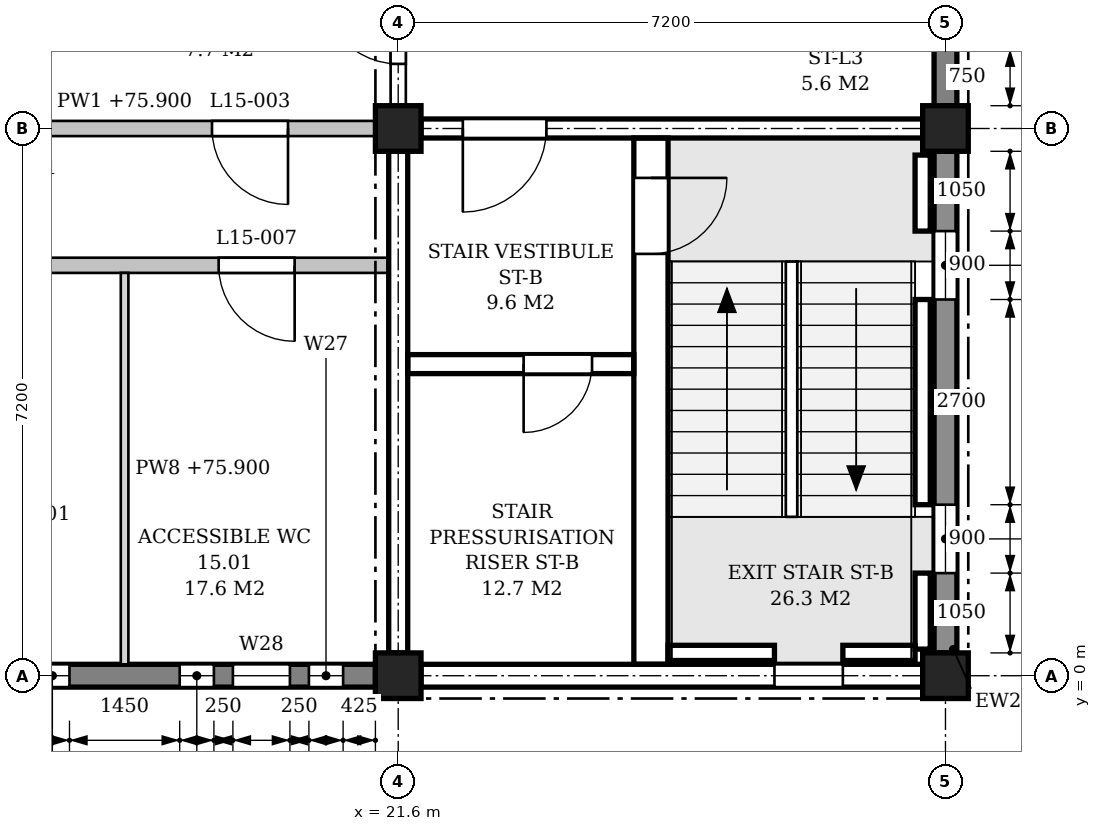
"""IFC4 building model, lengths in metres.
Left out: names, types, materials, properties, quantities, classifications, styles, units other than length and angle.
Written with IfcOpenShell. Run it as: python <this file> out.ifc"""

import sys

from ifc_helpers import new_model, si_unit, direction, frame, frame_2d, origin, origin_2d, place, context, subcontext, project, spatial, polyline, rectangle, outline, extrude, element, fill, save


model = new_model("IFC4")
c1 = context("Model", 3, precision=1e-05, world=origin(), true_north=direction((0.0, 1.0)))
c2 = subcontext(c1, "Body", "Model", "MODEL_VIEW")
j1 = project(units=[si_unit("LENGTHUNIT", "METRE"), si_unit("PLANEANGLEUNIT", "RADIAN")], contexts=[c1])
p1 = place(None, origin())
s1 = spatial("IfcSite", under=j1, at=p1, CompositionType="ELEMENT")
p2 = place(p1, origin())
s2 = spatial("IfcBuilding", under=s1, at=p2, CompositionType="ELEMENT")
p3 = place(p2, frame((0.0, 0.0, 72.3)))
s3 = spatial("IfcBuildingStorey", under=s2, at=p3, CompositionType="ELEMENT", Elevation=72.3)
for number, where, z_axis, x_axis in (
    (1, (21.6, 0.0, 0.0), (0.0, 0.0, 1.0), (1.0, 0.0, 0.0)),
    (2, (21.6, 7.2, 0.0), (0.0, 0.0, 1.0), (1.0, 0.0, 0.0)),
    (3, (28.8, 0.0, 0.0), (0.0, 0.0, 1.0), (1.0, 0.0, 0.0)),
    (4, (28.8, 7.2, 0.0), (0.0, 0.0, 1.0), (1.0, 0.0, 0.0)),
):
    element("IfcColumn", number, at=place(p3, frame(where, z_axis=z_axis, x_axis=x_axis)), inside=s3, PredefinedType="COLUMN", context=c2, shape_type="SweptSolid", body=[
        extrude(rectangle(XDim=0.6, YDim=0.6, at=origin_2d()), origin(), (0.0, 0.0, 1.0), 4.5),
    ])
p4 = place(p3, frame((14.7, 0.0, 0.0), z_axis=(0.0, 0.0, 1.0), x_axis=(1.0, 0.0, 0.0)))
e5 = element("IfcWall", 5, at=p4, inside=s3, PredefinedType="STANDARD", context=c2, shape_type="SweptSolid", body=[
    extrude(rectangle(XDim=6.6, YDim=0.3, at=frame_2d((3.3, 0.0))), origin(), (0.0, 0.0, 1.0), 3.65),
])
p5 = place(p4, frame((0.425, 0.0, 1.5)))
e6 = element("IfcOpeningElement", 6, at=p5, cuts=e5, PredefinedType="OPENING", context=c2, shape_type="SweptSolid", body=[
    extrude(outline(polyline([(0.0, 0.0), (0.45, 0.0), (0.45, 1.85), (0.225, 2.1), (0.0, 1.85), (0.0, 0.0)])), frame((0.0, 0.16, 0.0), z_axis=(0.0, -1.0, 0.0), x_axis=(1.0, 0.0, 0.0)), (0.0, 0.0, 1.0), 0.32),
])
p6 = place(p4, frame((1.125, 0.0, 0.9)))
e7 = element("IfcOpeningElement", 7, at=p6, cuts=e5, PredefinedType="OPENING", context=c2, shape_type="SweptSolid", body=[
    extrude(outline(polyline([(0.0, 0.0), (0.75, 0.0), (0.75, 2.25), (0.375, 2.7), (0.0, 2.25), (0.0, 0.0)])), frame((0.0, 0.16, 0.0), z_axis=(0.0, -1.0, 0.0), x_axis=(1.0, 0.0, 0.0)), (0.0, 0.0, 1.0), 0.32),
])
p7 = place(p4, frame((2.125, 0.0, 1.5)))
e8 = element("IfcOpeningElement", 8, at=p7, cuts=e5, PredefinedType="OPENING", context=c2, shape_type="SweptSolid", body=[
    extrude(outline(polyline([(0.0, 0.0), (0.45, 0.0), (0.45, 1.85), (0.225, 2.1), (0.0, 1.85), (0.0, 0.0)])), frame((0.0, 0.16, 0.0), z_axis=(0.0, -1.0, 0.0), x_axis=(1.0, 0.0, 0.0)), (0.0, 0.0, 1.0), 0.32),
])
p8 = place(p4, frame((4.025, 0.0, 1.5)))
e9 = element("IfcOpeningElement", 9, at=p8, cuts=e5, PredefinedType="OPENING", context=c2, shape_type="SweptSolid", body=[
    extrude(outline(polyline([(0.0, 0.0), (0.45, 0.0), (0.45, 1.85), (0.225, 2.1), (0.0, 1.85), (0.0, 0.0)])), frame((0.0, 0.16, 0.0), z_axis=(0.0, -1.0, 0.0), x_axis=(1.0, 0.0, 0.0)), (0.0, 0.0, 1.0), 0.32),
])
p9 = place(p4, frame((4.725, 0.0, 0.9)))
e10 = element("IfcOpeningElement", 10, at=p9, cuts=e5, PredefinedType="OPENING", context=c2, shape_type="SweptSolid", body=[
    extrude(outline(polyline([(0.0, 0.0), (0.75, 0.0), (0.75, 2.25), (0.375, 2.7), (0.0, 2.25), (0.0, 0.0)])), frame((0.0, 0.16, 0.0), z_axis=(0.0, -1.0, 0.0), x_axis=(1.0, 0.0, 0.0)), (0.0, 0.0, 1.0), 0.32),
])
p10 = place(p4, frame((5.725, 0.0, 1.5)))
e11 = element("IfcOpeningElement", 11, at=p10, cuts=e5, PredefinedType="OPENING", context=c2, shape_type="SweptSolid", body=[
    extrude(outline(polyline([(0.0, 0.0), (0.45, 0.0), (0.45, 1.85), (0.225, 2.1), (0.0, 1.85), (0.0, 0.0)])), frame((0.0, 0.16, 0.0), z_axis=(0.0, -1.0, 0.0), x_axis=(1.0, 0.0, 0.0)), (0.0, 0.0, 1.0), 0.32),
])
p11 = place(p3, frame((21.9, 0.0, 0.0), z_axis=(0.0, 0.0, 1.0), x_axis=(1.0, 0.0, 0.0)))
e12 = element("IfcWall", 12, at=p11, inside=s3, PredefinedType="STANDARD", context=c2, shape_type="SweptSolid", body=[
    extrude(rectangle(XDim=6.6, YDim=0.3, at=frame_2d((3.3, 0.0))), origin(), (0.0, 0.0, 1.0), 3.65),
])
p12 = place(p11, frame((4.65, 0.0, 0.9)))
e13 = element("IfcOpeningElement", 13, at=p12, cuts=e12, PredefinedType="OPENING", context=c2, shape_type="SweptSolid", body=[
    extrude(outline(polyline([(0.0, 0.0), (0.9, 0.0), (0.9, 2.25), (0.45, 2.7), (0.0, 2.25), (0.0, 0.0)])), frame((0.0, 0.16, 0.0), z_axis=(0.0, -1.0, 0.0), x_axis=(1.0, 0.0, 0.0)), (0.0, 0.0, 1.0), 0.32),
])
p13 = place(p3, frame((28.8, 0.3, 0.0), z_axis=(0.0, 0.0, 1.0), x_axis=(0.0, 1.0, 0.0)))
e14 = element("IfcWall", 14, at=p13, inside=s3, PredefinedType="STANDARD", context=c2, shape_type="SweptSolid", body=[
    extrude(rectangle(XDim=6.6, YDim=0.3, at=frame_2d((3.3, 0.0))), origin(), (0.0, 0.0, 1.0), 3.65),
])
p14 = place(p13, frame((1.05, 0.0, 0.9)))
e15 = element("IfcOpeningElement", 15, at=p14, cuts=e14, PredefinedType="OPENING", context=c2, shape_type="SweptSolid", body=[
    extrude(outline(polyline([(0.0, 0.0), (0.9, 0.0), (0.9, 2.25), (0.45, 2.7), (0.0, 2.25), (0.0, 0.0)])), frame((0.0, 0.16, 0.0), z_axis=(0.0, -1.0, 0.0), x_axis=(1.0, 0.0, 0.0)), (0.0, 0.0, 1.0), 0.32),
])
p15 = place(p13, frame((4.65, 0.0, 0.9)))
e16 = element("IfcOpeningElement", 16, at=p15, cuts=e14, PredefinedType="OPENING", context=c2, shape_type="SweptSolid", body=[
    extrude(outline(polyline([(0.0, 0.0), (0.9, 0.0), (0.9, 2.25), (0.45, 2.7), (0.0, 2.25), (0.0, 0.0)])), frame((0.0, 0.16, 0.0), z_axis=(0.0, -1.0, 0.0), x_axis=(1.0, 0.0, 0.0)), (0.0, 0.0, 1.0), 0.32),
])
p16 = place(p3, frame((28.8, 7.5, 0.0), z_axis=(0.0, 0.0, 1.0), x_axis=(0.0, 1.0, 0.0)))
e17 = element("IfcWall", 17, at=p16, inside=s3, PredefinedType="STANDARD", context=c2, shape_type="SweptSolid", body=[
    extrude(rectangle(XDim=6.6, YDim=0.3, at=frame_2d((3.3, 0.0))), origin(), (0.0, 0.0, 1.0), 3.65),
])
p17 = place(p16, frame((0.75, 0.0, 0.9)))
e18 = element("IfcOpeningElement", 18, at=p17, cuts=e17, PredefinedType="OPENING", context=c2, shape_type="SweptSolid", body=[
    extrude(outline(polyline([(0.0, 0.0), (1.5, 0.0), (1.5, 1.95), (0.75, 2.7), (0.0, 1.95), (0.0, 0.0)])), frame((0.0, 0.16, 0.0), z_axis=(0.0, -1.0, 0.0), x_axis=(1.0, 0.0, 0.0)), (0.0, 0.0, 1.0), 0.32),
])
p18 = place(p3, frame((21.9, 7.2, 0.0), z_axis=(0.0, 0.0, 1.0), x_axis=(1.0, 0.0, 0.0)))
e19 = element("IfcWall", 19, at=p18, inside=s3, PredefinedType="SHEAR", context=c2, shape_type="SweptSolid", body=[
    extrude(rectangle(XDim=6.6, YDim=0.25, at=frame_2d((3.3, 0.0))), origin(), (0.0, 0.0, 1.0), 3.6),
])
p19 = place(p18, frame((0.55, 0.0, 0.0)))
e20 = element("IfcOpeningElement", 20, at=p19, cuts=e19, PredefinedType="OPENING", context=c2, shape_type="SweptSolid", body=[
    extrude(rectangle(XDim=1.1, YDim=2.1, at=frame_2d((0.55, 1.05))), frame((0.0, 0.135, 0.0), z_axis=(0.0, -1.0, 0.0), x_axis=(1.0, 0.0, 0.0)), (0.0, 0.0, 1.0), 0.27),
])
p20 = place(p3, frame((21.6, 0.3, 0.0), z_axis=(0.0, 0.0, 1.0), x_axis=(0.0, 1.0, 0.0)))
e21 = element("IfcWall", 21, at=p20, inside=s3, PredefinedType="SHEAR", context=c2, shape_type="SweptSolid", body=[
    extrude(rectangle(XDim=6.6, YDim=0.25, at=frame_2d((3.3, 0.0))), origin(), (0.0, 0.0, 1.0), 3.6),
])
p21 = place(p3, frame((28.5, 0.35, -0.25), z_axis=(0.0, 0.0, 1.0), x_axis=(0.0, 1.0, 0.0)))
e22 = element("IfcWall", 22, at=p21, inside=s3, PredefinedType="SHEAR", context=c2, shape_type="SweptSolid", body=[
    extrude(rectangle(XDim=1.0, YDim=0.2, at=frame_2d((0.5, 0.0))), origin(), (0.0, 0.0, 1.0), 4.5),
])
p22 = place(p3, frame((28.5, 2.25, -0.25), z_axis=(0.0, 0.0, 1.0), x_axis=(0.0, 1.0, 0.0)))
e23 = element("IfcWall", 23, at=p22, inside=s3, PredefinedType="SHEAR", context=c2, shape_type="SweptSolid", body=[
    extrude(rectangle(XDim=2.7, YDim=0.2, at=frame_2d((1.35, 0.0))), origin(), (0.0, 0.0, 1.0), 4.5),
])
p23 = place(p3, frame((28.5, 5.85, -0.25), z_axis=(0.0, 0.0, 1.0), x_axis=(0.0, 1.0, 0.0)))
e24 = element("IfcWall", 24, at=p23, inside=s3, PredefinedType="SHEAR", context=c2, shape_type="SweptSolid", body=[
    extrude(rectangle(XDim=1.0, YDim=0.2, at=frame_2d((0.5, 0.0))), origin(), (0.0, 0.0, 1.0), 4.5),
])
p24 = place(p3, frame((25.15, 0.3, -0.25), z_axis=(0.0, 0.0, 1.0), x_axis=(1.0, 0.0, 0.0)))
e25 = element("IfcWall", 25, at=p24, inside=s3, PredefinedType="SHEAR", context=c2, shape_type="SweptSolid", body=[
    extrude(rectangle(XDim=1.4, YDim=0.2, at=frame_2d((0.7, 0.0))), origin(), (0.0, 0.0, 1.0), 4.5),
])
p25 = place(p3, frame((27.45, 0.3, -0.25), z_axis=(0.0, 0.0, 1.0), x_axis=(1.0, 0.0, 0.0)))
e26 = element("IfcWall", 26, at=p25, inside=s3, PredefinedType="SHEAR", context=c2, shape_type="SweptSolid", body=[
    extrude(rectangle(XDim=0.95, YDim=0.2, at=frame_2d((0.475, 0.0))), origin(), (0.0, 0.0, 1.0), 4.5),
])
p26 = place(p3, frame((24.925, 0.15, 0.0), z_axis=(0.0, 0.0, 1.0), x_axis=(0.0, 1.0, 0.0)))
e27 = element("IfcWall", 27, at=p26, inside=s3, PredefinedType="SHEAR", context=c2, shape_type="SweptSolid", body=[
    extrude(rectangle(XDim=6.925, YDim=0.45, at=frame_2d((3.462, 0.0))), origin(), (0.0, 0.0, 1.0), 4.25),
])
p27 = place(p26, frame((5.4, 0.0, 0.0)))
e28 = element("IfcOpeningElement", 28, at=p27, cuts=e27, PredefinedType="OPENING", context=c2, shape_type="SweptSolid", body=[
    extrude(rectangle(XDim=1.0, YDim=2.1, at=frame_2d((0.5, 1.05))), frame((0.0, 0.235, 0.0), z_axis=(0.0, -1.0, 0.0), x_axis=(1.0, 0.0, 0.0)), (0.0, 0.0, 1.0), 0.47),
])
p28 = place(p3, frame((21.725, 4.1, 0.0), z_axis=(0.0, 0.0, 1.0), x_axis=(1.0, 0.0, 0.0)))
e29 = element("IfcWall", 29, at=p28, inside=s3, PredefinedType="SHEAR", context=c2, shape_type="SweptSolid", body=[
    extrude(rectangle(XDim=2.975, YDim=0.25, at=frame_2d((1.487, 0.0))), origin(), (0.0, 0.0, 1.0), 4.25),
])
p29 = place(p28, frame((1.525, 0.0, 0.0)))
e30 = element("IfcOpeningElement", 30, at=p29, cuts=e29, PredefinedType="OPENING", context=c2, shape_type="SweptSolid", body=[
    extrude(rectangle(XDim=0.9, YDim=2.1, at=frame_2d((0.45, 1.05))), frame((0.0, 0.135, 0.0), z_axis=(0.0, -1.0, 0.0), x_axis=(1.0, 0.0, 0.0)), (0.0, 0.0, 1.0), 0.27),
])
p30 = place(p3, frame((7.325, 5.4, 0.0), z_axis=(0.0, 0.0, 1.0), x_axis=(1.0, 0.0, 0.0)))
e31 = element("IfcWall", 31, at=p30, inside=s3, PredefinedType="PARTITIONING", context=c2, shape_type="SweptSolid", body=[
    extrude(outline(polyline([(0.0, 0.0), (14.15, 0.0), (14.15, 3.6), (14.075, 3.6), (14.075, 4.25), (7.275, 4.25), (7.275, 3.6), (6.875, 3.6), (6.875, 4.25), (0.075, 4.25), (0.075, 3.6), (0.0, 3.6), (0.0, 0.0)])), frame((0.0, 0.1, 0.0), z_axis=(0.0, -1.0, 0.0), x_axis=(1.0, 0.0, 0.0)), (0.0, 0.0, 1.0), 0.2),
])
p31 = place(p30, frame((1.238, 0.0, 0.0)))
e32 = element("IfcOpeningElement", 32, at=p31, cuts=e31, PredefinedType="OPENING", context=c2, shape_type="SweptSolid", body=[
    extrude(rectangle(XDim=1.0, YDim=2.1, at=frame_2d((0.5, 1.05))), frame((0.0, 0.11, 0.0), z_axis=(0.0, -1.0, 0.0), x_axis=(1.0, 0.0, 0.0)), (0.0, 0.0, 1.0), 0.22),
])
p32 = place(p30, frame((4.775, 0.0, 0.0)))
e33 = element("IfcOpeningElement", 33, at=p32, cuts=e31, PredefinedType="OPENING", context=c2, shape_type="SweptSolid", body=[
    extrude(rectangle(XDim=1.0, YDim=2.1, at=frame_2d((0.5, 1.05))), frame((0.0, 0.11, 0.0), z_axis=(0.0, -1.0, 0.0), x_axis=(1.0, 0.0, 0.0)), (0.0, 0.0, 1.0), 0.22),
])
p33 = place(p30, frame((8.375, 0.0, 0.0)))
e34 = element("IfcOpeningElement", 34, at=p33, cuts=e31, PredefinedType="OPENING", context=c2, shape_type="SweptSolid", body=[
    extrude(rectangle(XDim=1.0, YDim=2.1, at=frame_2d((0.5, 1.05))), frame((0.0, 0.11, 0.0), z_axis=(0.0, -1.0, 0.0), x_axis=(1.0, 0.0, 0.0)), (0.0, 0.0, 1.0), 0.22),
])
p34 = place(p30, frame((11.913, 0.0, 0.0)))
e35 = element("IfcOpeningElement", 35, at=p34, cuts=e31, PredefinedType="OPENING", context=c2, shape_type="SweptSolid", body=[
    extrude(rectangle(XDim=1.0, YDim=2.1, at=frame_2d((0.5, 1.05))), frame((0.0, 0.11, 0.0), z_axis=(0.0, -1.0, 0.0), x_axis=(1.0, 0.0, 0.0)), (0.0, 0.0, 1.0), 0.22),
])
p35 = place(p3, frame((14.7, 7.2, 0.0), z_axis=(0.0, 0.0, 1.0), x_axis=(1.0, 0.0, 0.0)))
e36 = element("IfcWall", 36, at=p35, inside=s3, PredefinedType="PARTITIONING", context=c2, shape_type="SweptSolid", body=[
    extrude(rectangle(XDim=6.6, YDim=0.2, at=frame_2d((3.3, 0.0))), origin(), (0.0, 0.0, 1.0), 3.6),
])
p36 = place(p35, frame((4.45, 0.0, 0.0)))
e37 = element("IfcOpeningElement", 37, at=p36, cuts=e36, PredefinedType="OPENING", context=c2, shape_type="SweptSolid", body=[
    extrude(rectangle(XDim=1.0, YDim=2.1, at=frame_2d((0.5, 1.05))), frame((0.0, 0.11, 0.0), z_axis=(0.0, -1.0, 0.0), x_axis=(1.0, 0.0, 0.0)), (0.0, 0.0, 1.0), 0.22),
])
p37 = place(p3, frame((18.0, 0.15, 0.0), z_axis=(0.0, 0.0, 1.0), x_axis=(0.0, 1.0, 0.0)))
e38 = element("IfcWall", 38, at=p37, inside=s3, PredefinedType="PARTITIONING", context=c2, shape_type="SweptSolid", body=[
    extrude(rectangle(XDim=5.15, YDim=0.1, at=frame_2d((2.575, 0.0))), origin(), (0.0, 0.0, 1.0), 3.6),
])
p38 = place(p3, frame((21.6, 7.5, 0.0), z_axis=(0.0, 0.0, 1.0), x_axis=(0.0, 1.0, 0.0)))
e39 = element("IfcWall", 39, at=p38, inside=s3, PredefinedType="PARTITIONING", context=c2, shape_type="SweptSolid", body=[
    extrude(rectangle(XDim=2.825, YDim=0.2, at=frame_2d((1.413, 0.0))), origin(), (0.0, 0.0, 1.0), 3.6),
])
p39 = place(p38, frame((0.55, 0.0, 0.0)))
e40 = element("IfcOpeningElement", 40, at=p39, cuts=e39, PredefinedType="OPENING", context=c2, shape_type="SweptSolid", body=[
    extrude(rectangle(XDim=1.0, YDim=2.1, at=frame_2d((0.5, 1.05))), frame((0.0, 0.11, 0.0), z_axis=(0.0, -1.0, 0.0), x_axis=(1.0, 0.0, 0.0)), (0.0, 0.0, 1.0), 0.22),
])
p40 = place(p14, origin())
e41 = element("IfcWindow", 41, at=p40, inside=s3, PartitioningType="SINGLE_PANEL", PredefinedType="WINDOW", context=c2, shape_type="SweptSolid", body=[
    extrude(outline(polyline([(0.0, 0.0), (0.9, 0.0), (0.9, 2.25), (0.45, 2.7), (0.0, 2.25), (0.0, 0.0)])), frame((0.0, 0.03, 0.0), z_axis=(0.0, -1.0, 0.0), x_axis=(1.0, 0.0, 0.0)), (0.0, 0.0, 1.0), 0.06),
])
fill(e15, e41)
p41 = place(p15, origin())
e42 = element("IfcWindow", 42, at=p41, inside=s3, PartitioningType="SINGLE_PANEL", PredefinedType="WINDOW", context=c2, shape_type="SweptSolid", body=[
    extrude(outline(polyline([(0.0, 0.0), (0.9, 0.0), (0.9, 2.25), (0.45, 2.7), (0.0, 2.25), (0.0, 0.0)])), frame((0.0, 0.03, 0.0), z_axis=(0.0, -1.0, 0.0), x_axis=(1.0, 0.0, 0.0)), (0.0, 0.0, 1.0), 0.06),
])
fill(e16, e42)
p42 = place(p7, origin())
e43 = element("IfcWindow", 43, at=p42, inside=s3, PartitioningType="SINGLE_PANEL", PredefinedType="WINDOW", context=c2, shape_type="SweptSolid", body=[
    extrude(outline(polyline([(0.0, 0.0), (0.45, 0.0), (0.45, 1.85), (0.225, 2.1), (0.0, 1.85), (0.0, 0.0)])), frame((0.0, 0.03, 0.0), z_axis=(0.0, -1.0, 0.0), x_axis=(1.0, 0.0, 0.0)), (0.0, 0.0, 1.0), 0.06),
])
fill(e8, e43)
p43 = place(p8, origin())
e44 = element("IfcWindow", 44, at=p43, inside=s3, PartitioningType="SINGLE_PANEL", PredefinedType="WINDOW", context=c2, shape_type="SweptSolid", body=[
    extrude(outline(polyline([(0.0, 0.0), (0.45, 0.0), (0.45, 1.85), (0.225, 2.1), (0.0, 1.85), (0.0, 0.0)])), frame((0.0, 0.03, 0.0), z_axis=(0.0, -1.0, 0.0), x_axis=(1.0, 0.0, 0.0)), (0.0, 0.0, 1.0), 0.06),
])
fill(e9, e44)
p44 = place(p9, origin())
e45 = element("IfcWindow", 45, at=p44, inside=s3, PartitioningType="SINGLE_PANEL", PredefinedType="WINDOW", context=c2, shape_type="SweptSolid", body=[
    extrude(outline(polyline([(0.0, 0.0), (0.75, 0.0), (0.75, 2.25), (0.375, 2.7), (0.0, 2.25), (0.0, 0.0)])), frame((0.0, 0.03, 0.0), z_axis=(0.0, -1.0, 0.0), x_axis=(1.0, 0.0, 0.0)), (0.0, 0.0, 1.0), 0.06),
])
fill(e10, e45)
p45 = place(p10, origin())
e46 = element("IfcWindow", 46, at=p45, inside=s3, PartitioningType="SINGLE_PANEL", PredefinedType="WINDOW", context=c2, shape_type="SweptSolid", body=[
    extrude(outline(polyline([(0.0, 0.0), (0.45, 0.0), (0.45, 1.85), (0.225, 2.1), (0.0, 1.85), (0.0, 0.0)])), frame((0.0, 0.03, 0.0), z_axis=(0.0, -1.0, 0.0), x_axis=(1.0, 0.0, 0.0)), (0.0, 0.0, 1.0), 0.06),
])
fill(e11, e46)
p46 = place(p12, origin())
e47 = element("IfcWindow", 47, at=p46, inside=s3, PartitioningType="SINGLE_PANEL", PredefinedType="WINDOW", context=c2, shape_type="SweptSolid", body=[
    extrude(outline(polyline([(0.0, 0.0), (0.9, 0.0), (0.9, 2.25), (0.45, 2.7), (0.0, 2.25), (0.0, 0.0)])), frame((0.0, 0.03, 0.0), z_axis=(0.0, -1.0, 0.0), x_axis=(1.0, 0.0, 0.0)), (0.0, 0.0, 1.0), 0.06),
])
fill(e13, e47)
p47 = place(p27, frame((1.0, 0.0, 0.0), z_axis=(0.0, 0.0, 1.0), x_axis=(-1.0, 0.0, 0.0)))
e48 = element("IfcDoor", 48, at=p47, inside=s3, OperationType="SINGLE_SWING_LEFT", PredefinedType="DOOR", context=c2, shape_type="SweptSolid", body=[
    extrude(rectangle(XDim=1.0, YDim=2.1, at=frame_2d((0.5, 1.05))), frame((0.0, 0.025, 0.0), z_axis=(0.0, -1.0, 0.0), x_axis=(1.0, 0.0, 0.0)), (0.0, 0.0, 1.0), 0.05),
])
fill(e28, e48)
p48 = place(p19, frame((1.1, 0.0, 0.0), z_axis=(0.0, 0.0, 1.0), x_axis=(-1.0, 0.0, 0.0)))
e49 = element("IfcDoor", 49, at=p48, inside=s3, OperationType="SINGLE_SWING_RIGHT", PredefinedType="DOOR", context=c2, shape_type="SweptSolid", body=[
    extrude(rectangle(XDim=1.1, YDim=2.1, at=frame_2d((0.55, 1.05))), frame((0.0, 0.025, 0.0), z_axis=(0.0, -1.0, 0.0), x_axis=(1.0, 0.0, 0.0)), (0.0, 0.0, 1.0), 0.05),
])
fill(e20, e49)
p49 = place(p29, frame((0.9, 0.0, 0.0), z_axis=(0.0, 0.0, 1.0), x_axis=(-1.0, 0.0, 0.0)))
e50 = element("IfcDoor", 50, at=p49, inside=s3, OperationType="SINGLE_SWING_RIGHT", PredefinedType="DOOR", context=c2, shape_type="SweptSolid", body=[
    extrude(rectangle(XDim=0.9, YDim=2.1, at=frame_2d((0.45, 1.05))), frame((0.0, 0.025, 0.0), z_axis=(0.0, -1.0, 0.0), x_axis=(1.0, 0.0, 0.0)), (0.0, 0.0, 1.0), 0.05),
])
fill(e30, e50)
p50 = place(p39, origin())
e51 = element("IfcDoor", 51, at=p50, inside=s3, OperationType="SINGLE_SWING_RIGHT", PredefinedType="DOOR", context=c2, shape_type="SweptSolid", body=[
    extrude(rectangle(XDim=1.0, YDim=2.1, at=frame_2d((0.5, 1.05))), frame((0.0, 0.025, 0.0), z_axis=(0.0, -1.0, 0.0), x_axis=(1.0, 0.0, 0.0)), (0.0, 0.0, 1.0), 0.05),
])
fill(e40, e51)
p51 = place(p36, frame((1.0, 0.0, 0.0), z_axis=(0.0, 0.0, 1.0), x_axis=(-1.0, 0.0, 0.0)))
e52 = element("IfcDoor", 52, at=p51, inside=s3, OperationType="SINGLE_SWING_LEFT", PredefinedType="DOOR", context=c2, shape_type="SweptSolid", body=[
    extrude(rectangle(XDim=1.0, YDim=2.1, at=frame_2d((0.5, 1.05))), frame((0.0, 0.025, 0.0), z_axis=(0.0, -1.0, 0.0), x_axis=(1.0, 0.0, 0.0)), (0.0, 0.0, 1.0), 0.05),
])
fill(e37, e52)
p52 = place(p34, frame((1.0, 0.0, 0.0), z_axis=(0.0, 0.0, 1.0), x_axis=(-1.0, 0.0, 0.0)))
e53 = element("IfcDoor", 53, at=p52, inside=s3, OperationType="SINGLE_SWING_LEFT", PredefinedType="DOOR", context=c2, shape_type="SweptSolid", body=[
    extrude(rectangle(XDim=1.0, YDim=2.1, at=frame_2d((0.5, 1.05))), frame((0.0, 0.025, 0.0), z_axis=(0.0, -1.0, 0.0), x_axis=(1.0, 0.0, 0.0)), (0.0, 0.0, 1.0), 0.05),
])
fill(e35, e53)
save(model, sys.argv[1])
